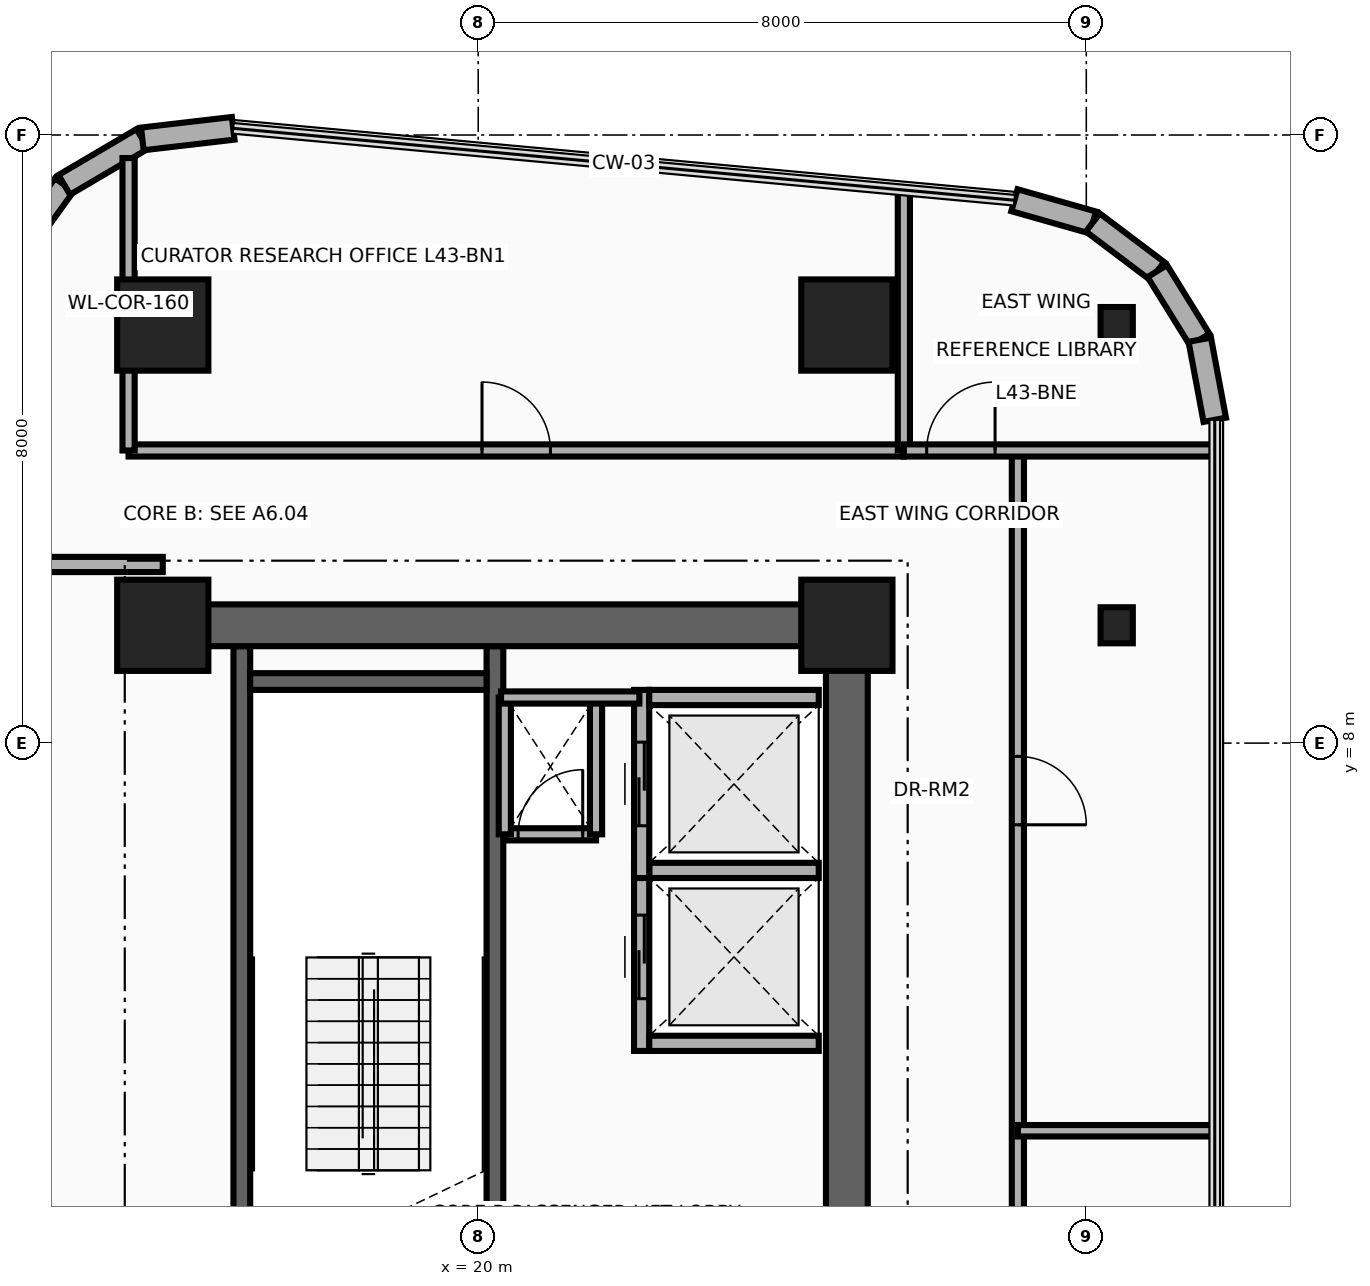
"""IFC4 building model, lengths in metres.
Left out: names, types, materials, properties, quantities, classifications, styles, units other than length and angle.
Written with IfcOpenShell. Run it as: python <this file> out.ifc"""

import sys

from ifc_helpers import new_model, si_unit, direction, frame, frame_2d, origin, origin_2d, place, context, subcontext, project, spatial, rectangle, i_section, extrude, source, transform, mapped, element, fill, save


model = new_model("IFC4")
c1 = context("Model", 3, precision=1e-05, world=origin(), true_north=direction((0.0, 1.0)))
c2 = subcontext(c1, "Body", "Model", "MODEL_VIEW")
j1 = project(units=[si_unit("LENGTHUNIT", "METRE"), si_unit("PLANEANGLEUNIT", "RADIAN")], contexts=[c1])
p1 = place(None, origin())
s1 = spatial("IfcSite", under=j1, at=p1, CompositionType="ELEMENT")
p2 = place(p1, origin())
s2 = spatial("IfcBuilding", under=s1, at=p2, CompositionType="ELEMENT")
p3 = place(p2, frame((0.0, 0.0, 168.6)))
s3 = spatial("IfcBuildingStorey", under=s2, at=p3, CompositionType="ELEMENT", Elevation=168.6)
for number, where, z_axis, x_axis in (
    (1, (16.89, 0.68, 0.0), (0.0, 0.0, 1.0), (0.0, 1.0, 0.0)),
    (2, (20.22, 0.68, 0.0), (0.0, 0.0, 1.0), (0.0, 1.0, 0.0)),
):
    element("IfcWall", number, at=place(p3, frame(where, z_axis=z_axis, x_axis=x_axis)), inside=s3, PredefinedType="SHEAR", context=c2, shape_type="SweptSolid", body=[
        extrude(rectangle(XDim=8.595, YDim=0.22, at=frame_2d((4.297, 0.0))), origin(), (0.0, 0.0, 1.0), 3.3),
    ])
p4 = place(p3, frame((17.0, 8.81, 0.0), z_axis=(0.0, 0.0, 1.0), x_axis=(1.0, 0.0, 0.0)))
e3 = element("IfcWall", 3, at=p4, inside=s3, PredefinedType="SHEAR", context=c2, shape_type="SweptSolid", body=[
    extrude(rectangle(XDim=3.11, YDim=0.22, at=frame_2d((1.555, 0.0))), origin(), (0.0, 0.0, 1.0), 3.3),
])
p5 = place(p3, frame((24.85, 0.95, 0.0), z_axis=(0.0, 0.0, 1.0), x_axis=(0.0, 1.0, 0.0)))
e4 = element("IfcWall", 4, at=p5, inside=s3, PredefinedType="SHEAR", context=c2, shape_type="SweptSolid", body=[
    extrude(rectangle(XDim=8.875, YDim=0.55, at=frame_2d((4.438, 0.0))), origin(), (0.0, 0.0, 1.0), 3.3),
])
p6 = place(p3, frame((15.85, 9.55, 0.0), z_axis=(0.0, 0.0, 1.0), x_axis=(1.0, 0.0, 0.0)))
e5 = element("IfcWall", 5, at=p6, inside=s3, PredefinedType="SHEAR", context=c2, shape_type="SweptSolid", body=[
    extrude(rectangle(XDim=9.0, YDim=0.55, at=frame_2d((4.5, 0.0))), origin(), (0.0, 0.0, 1.0), 3.3),
])
m1 = source(origin(), c2, "Body", "SweptSolid", [
    extrude(rectangle(XDim=1.2, YDim=1.2, at=origin_2d()), origin(), (0.0, 0.0, 1.0), 3.7),
])
for number, where, z_axis, x_axis in (
    (6, (15.85, 9.55, 0.0), (0.0, 0.0, 1.0), (1.0, 0.0, 0.0)),
    (7, (24.85, 9.55, 0.0), (0.0, 0.0, 1.0), (1.0, 0.0, 0.0)),
):
    element("IfcColumn", number, at=place(p3, frame(where, z_axis=z_axis, x_axis=x_axis)), inside=s3, PredefinedType="COLUMN", context=c2, shape_type="MappedRepresentation", body=[
        mapped(m1, transform((0.0, 0.0, 0.0), x_axis=(1.0, 0.0, 0.0), y_axis=(0.0, 1.0, 0.0), z_axis=(0.0, 0.0, 1.0), scale=1.0)),
    ])
m2 = source(origin(), c2, "Body", "SweptSolid", [
    extrude(i_section(OverallWidth=0.424, OverallDepth=0.474, WebThickness=0.048, FlangeThickness=0.077, at=origin_2d()), origin(), (0.0, 0.0, 1.0), 3.7),
])
p7 = place(p3, frame((28.4, 9.55, 0.0), z_axis=(0.0, 0.0, 1.0), x_axis=(1.0, 0.0, 0.0)))
e8 = element("IfcColumn", 8, at=p7, inside=s3, PredefinedType="COLUMN", context=c2, shape_type="MappedRepresentation", body=[
    mapped(m2, transform((0.0, 0.0, 0.0), x_axis=(1.0, 0.0, 0.0), y_axis=(0.0, 1.0, 0.0), z_axis=(0.0, 0.0, 1.0), scale=1.0)),
])
for number, where, z_axis, x_axis in (
    (9, (15.85, 13.5, 0.0), (0.0, 0.0, 1.0), (1.0, 0.0, 0.0)),
    (10, (24.85, 13.5, 0.0), (0.0, 0.0, 1.0), (1.0, 0.0, 0.0)),
):
    element("IfcColumn", number, at=place(p3, frame(where, z_axis=z_axis, x_axis=x_axis)), inside=s3, PredefinedType="COLUMN", context=c2, shape_type="MappedRepresentation", body=[
        mapped(m1, transform((0.0, 0.0, 0.0), x_axis=(1.0, 0.0, 0.0), y_axis=(0.0, 1.0, 0.0), z_axis=(0.0, 0.0, 1.0), scale=1.0)),
    ])
p8 = place(p3, frame((28.4, 13.5, 0.0), z_axis=(0.0, 0.0, 1.0), x_axis=(1.0, 0.0, 0.0)))
e11 = element("IfcColumn", 11, at=p8, inside=s3, PredefinedType="COLUMN", context=c2, shape_type="MappedRepresentation", body=[
    mapped(m2, transform((0.0, 0.0, 0.0), x_axis=(1.0, 0.0, 0.0), y_axis=(0.0, 1.0, 0.0), z_axis=(0.0, 0.0, 1.0), scale=1.0)),
])
for number, where, z_axis, x_axis in (
    (12, (13.858, 14.377, 0.0), (0.0, 0.0, 1.0), (0.584, 0.812, 0.0)),
    (13, (14.554, 15.344, 0.0), (0.0, 0.0, 1.0), (0.862, 0.507, 0.0)),
):
    element("IfcWall", number, at=place(p3, frame(where, z_axis=z_axis, x_axis=x_axis)), inside=s3, PredefinedType="SOLIDWALL", context=c2, shape_type="SweptSolid", body=[
        extrude(rectangle(XDim=1.192, YDim=0.3, at=frame_2d((0.596, 0.0))), origin(), (0.0, 0.0, 1.0), 3.3),
    ])
p9 = place(p3, frame((15.581, 15.949, 0.0), z_axis=(0.0, 0.0, 1.0), x_axis=(0.993288417722, 0.115663819837, 0.0)))
e14 = element("IfcWall", 14, at=p9, inside=s3, PredefinedType="SOLIDWALL", context=c2, shape_type="SweptSolid", body=[
    extrude(rectangle(XDim=1.203, YDim=0.3, at=frame_2d((0.602, 0.0))), origin(), (0.0, 0.0, 1.0), 3.3),
])
p10 = place(p3, frame((27.055, 15.142, 0.0), z_axis=(0.0, 0.0, 1.0), x_axis=(0.962012179147, -0.273006533206, 0.0)))
e15 = element("IfcWall", 15, at=p10, inside=s3, PredefinedType="SOLIDWALL", context=c2, shape_type="SweptSolid", body=[
    extrude(rectangle(XDim=1.072, YDim=0.3, at=frame_2d((0.536, 0.0))), origin(), (0.0, 0.0, 1.0), 3.3),
])
for number, where, z_axis, x_axis in (
    (16, (28.086, 14.849, 0.0), (0.0, 0.0, 1.0), (0.798, -0.602, 0.0)),
    (17, (28.934, 14.21, 0.0), (0.0, 0.0, 1.0), (0.527, -0.85, 0.0)),
):
    element("IfcWall", number, at=place(p3, frame(where, z_axis=z_axis, x_axis=x_axis)), inside=s3, PredefinedType="SOLIDWALL", context=c2, shape_type="SweptSolid", body=[
        extrude(rectangle(XDim=1.062, YDim=0.3, at=frame_2d((0.531, 0.0))), origin(), (0.0, 0.0, 1.0), 3.3),
    ])
p11 = place(p3, frame((29.493, 13.307, 0.0), z_axis=(0.0, 0.0, 1.0), x_axis=(0.183752343116, -0.98297257154, 0.0)))
e18 = element("IfcWall", 18, at=p11, inside=s3, PredefinedType="SOLIDWALL", context=c2, shape_type="SweptSolid", body=[
    extrude(rectangle(XDim=1.072, YDim=0.3, at=frame_2d((0.536, 0.0))), origin(), (0.0, 0.0, 1.0), 3.3),
])
p12 = place(p3, frame((22.15, 3.95, 0.0), z_axis=(0.0, 0.0, 1.0), x_axis=(0.0, 1.0, 0.0)))
e19 = element("IfcWall", 19, at=p12, inside=s3, PredefinedType="MOVABLE", context=c2, shape_type="SweptSolid", body=[
    extrude(rectangle(XDim=2.475, YDim=0.2, at=frame_2d((1.238, 0.0))), origin(), (0.0, 0.0, 1.0), 3.3),
])
p13 = place(p12, frame((0.688, 0.0, 0.0)))
e20 = element("IfcOpeningElement", 20, at=p13, cuts=e19, PredefinedType="OPENING", context=c2, shape_type="SweptSolid", body=[
    extrude(rectangle(XDim=1.1, YDim=2.1, at=frame_2d((0.55, 1.05))), frame((0.0, 0.115, 0.0), z_axis=(0.0, -1.0, 0.0), x_axis=(1.0, 0.0, 0.0)), (0.0, 0.0, 1.0), 0.23),
])
for number, where, z_axis, x_axis in (
    (21, (22.25, 4.05, 0.0), (0.0, 0.0, 1.0), (1.0, 0.0, 0.0)),
    (22, (22.25, 6.325, 0.0), (0.0, 0.0, 1.0), (1.0, 0.0, 0.0)),
):
    element("IfcWall", number, at=place(p3, frame(where, z_axis=z_axis, x_axis=x_axis)), inside=s3, PredefinedType="MOVABLE", context=c2, shape_type="SweptSolid", body=[
        extrude(rectangle(XDim=2.23, YDim=0.2, at=frame_2d((1.115, 0.0))), origin(), (0.0, 0.0, 1.0), 3.3),
    ])
p14 = place(p3, frame((22.15, 6.225, 0.0), z_axis=(0.0, 0.0, 1.0), x_axis=(0.0, 1.0, 0.0)))
e23 = element("IfcWall", 23, at=p14, inside=s3, PredefinedType="MOVABLE", context=c2, shape_type="SweptSolid", body=[
    extrude(rectangle(XDim=2.475, YDim=0.2, at=frame_2d((1.237, 0.0))), origin(), (0.0, 0.0, 1.0), 3.3),
])
p15 = place(p14, frame((0.688, 0.0, 0.0)))
e24 = element("IfcOpeningElement", 24, at=p15, cuts=e23, PredefinedType="OPENING", context=c2, shape_type="SweptSolid", body=[
    extrude(rectangle(XDim=1.1, YDim=2.1, at=frame_2d((0.55, 1.05))), frame((0.0, 0.115, 0.0), z_axis=(0.0, -1.0, 0.0), x_axis=(1.0, 0.0, 0.0)), (0.0, 0.0, 1.0), 0.23),
])
p16 = place(p3, frame((22.25, 8.6, 0.0), z_axis=(0.0, 0.0, 1.0), x_axis=(1.0, 0.0, 0.0)))
e25 = element("IfcWall", 25, at=p16, inside=s3, PredefinedType="MOVABLE", context=c2, shape_type="SweptSolid", body=[
    extrude(rectangle(XDim=2.23, YDim=0.2, at=frame_2d((1.115, 0.0))), origin(), (0.0, 0.0, 1.0), 3.3),
])
p17 = place(p3, frame((20.35, 6.8, 0.0), z_axis=(0.0, 0.0, 1.0), x_axis=(1.0, 0.0, 0.0)))
e26 = element("IfcWall", 26, at=p17, inside=s3, PredefinedType="PARTITIONING", context=c2, shape_type="SweptSolid", body=[
    extrude(rectangle(XDim=1.2, YDim=0.16, at=frame_2d((0.6, 0.0))), origin(), (0.0, 0.0, 1.0), 3.3),
])
p18 = place(p17, frame((0.175, 0.0, 0.0)))
e27 = element("IfcOpeningElement", 27, at=p18, cuts=e26, PredefinedType="OPENING", context=c2, shape_type="SweptSolid", body=[
    extrude(rectangle(XDim=0.85, YDim=2.05, at=frame_2d((0.425, 1.025))), frame((0.0, 0.095, 0.0), z_axis=(0.0, -1.0, 0.0), x_axis=(1.0, 0.0, 0.0)), (0.0, 0.0, 1.0), 0.19),
])
for number, where, z_axis, x_axis in (
    (28, (21.55, 6.8, 0.0), (0.0, 0.0, 1.0), (0.0, 1.0, 0.0)),
    (29, (20.35, 6.8, 0.0), (0.0, 0.0, 1.0), (0.0, 1.0, 0.0)),
):
    element("IfcWall", number, at=place(p3, frame(where, z_axis=z_axis, x_axis=x_axis)), inside=s3, PredefinedType="PARTITIONING", context=c2, shape_type="SweptSolid", body=[
        extrude(rectangle(XDim=1.8, YDim=0.16, at=frame_2d((0.9, 0.0))), origin(), (0.0, 0.0, 1.0), 3.3),
    ])
p19 = place(p3, frame((20.3, 8.6, 0.0), z_axis=(0.0, 0.0, 1.0), x_axis=(1.0, 0.0, 0.0)))
e30 = element("IfcWall", 30, at=p19, inside=s3, PredefinedType="PARTITIONING", context=c2, shape_type="SweptSolid", body=[
    extrude(rectangle(XDim=1.82, YDim=0.16, at=frame_2d((0.91, 0.0))), origin(), (0.0, 0.0, 1.0), 3.3),
])
p20 = place(p3, frame((15.4, 11.85, 0.0), z_axis=(0.0, 0.0, 1.0), x_axis=(1.0, 0.0, 0.0)))
e31 = element("IfcWall", 31, at=p20, inside=s3, PredefinedType="PARTITIONING", context=c2, shape_type="SweptSolid", body=[
    extrude(rectangle(XDim=10.2, YDim=0.16, at=frame_2d((5.1, 0.0))), origin(), (0.0, 0.0, 1.0), 2.674),
])
p21 = place(p20, frame((4.65, 0.0, 0.0)))
e32 = element("IfcOpeningElement", 32, at=p21, cuts=e31, PredefinedType="OPENING", context=c2, shape_type="SweptSolid", body=[
    extrude(rectangle(XDim=0.9, YDim=2.1, at=frame_2d((0.45, 1.05))), frame((0.0, 0.095, 0.0), z_axis=(0.0, -1.0, 0.0), x_axis=(1.0, 0.0, 0.0)), (0.0, 0.0, 1.0), 0.19),
])
p22 = place(p3, frame((15.4, 11.85, 0.0), z_axis=(0.0, 0.0, 1.0), x_axis=(0.0, 1.0, 0.0)))
e33 = element("IfcWall", 33, at=p22, inside=s3, PredefinedType="PARTITIONING", context=c2, shape_type="SweptSolid", body=[
    extrude(rectangle(XDim=3.847, YDim=0.16, at=frame_2d((1.923, 0.0))), origin(), (0.0, 0.0, 1.0), 1.785),
])
p23 = place(p3, frame((25.6, 11.85, 0.0), z_axis=(0.0, 0.0, 1.0), x_axis=(0.0, 1.0, 0.0)))
e34 = element("IfcWall", 34, at=p23, inside=s3, PredefinedType="PARTITIONING", context=c2, shape_type="SweptSolid", body=[
    extrude(rectangle(XDim=3.426, YDim=0.16, at=frame_2d((1.713, 0.0))), origin(), (0.0, 0.0, 1.0), 2.085),
])
p24 = place(p3, frame((27.1, -11.701, 0.0), z_axis=(0.0, 0.0, 1.0), x_axis=(0.0, 1.0, 0.0)))
e35 = element("IfcWall", 35, at=p24, inside=s3, PredefinedType="PARTITIONING", context=c2, shape_type="SweptSolid", body=[
    extrude(rectangle(XDim=23.551, YDim=0.16, at=frame_2d((11.775, 0.0))), origin(), (0.0, 0.0, 1.0), 2.085),
])
p25 = place(p24, frame((2.56, 0.0, 0.0)))
e36 = element("IfcOpeningElement", 36, at=p25, cuts=e35, PredefinedType="OPENING", context=c2, shape_type="SweptSolid", body=[
    extrude(rectangle(XDim=0.9, YDim=2.04, at=frame_2d((0.45, 1.02))), frame((0.0, 0.095, 0.0), z_axis=(0.0, -1.0, 0.0), x_axis=(1.0, 0.0, 0.0)), (0.0, 0.0, 1.0), 0.19),
])
p26 = place(p24, frame((9.676, 0.0, 0.0)))
e37 = element("IfcOpeningElement", 37, at=p26, cuts=e35, PredefinedType="OPENING", context=c2, shape_type="SweptSolid", body=[
    extrude(rectangle(XDim=0.9, YDim=2.04, at=frame_2d((0.45, 1.02))), frame((0.0, 0.095, 0.0), z_axis=(0.0, -1.0, 0.0), x_axis=(1.0, 0.0, 0.0)), (0.0, 0.0, 1.0), 0.19),
])
p27 = place(p24, frame((18.626, 0.0, 0.0)))
e38 = element("IfcOpeningElement", 38, at=p27, cuts=e35, PredefinedType="OPENING", context=c2, shape_type="SweptSolid", body=[
    extrude(rectangle(XDim=0.9, YDim=2.04, at=frame_2d((0.45, 1.02))), frame((0.0, 0.095, 0.0), z_axis=(0.0, -1.0, 0.0), x_axis=(1.0, 0.0, 0.0)), (0.0, 0.0, 1.0), 0.19),
])
p28 = place(p3, frame((25.6, 11.85, 0.0), z_axis=(0.0, 0.0, 1.0), x_axis=(1.0, 0.0, 0.0)))
e39 = element("IfcWall", 39, at=p28, inside=s3, PredefinedType="PARTITIONING", context=c2, shape_type="SweptSolid", body=[
    extrude(rectangle(XDim=4.09, YDim=0.16, at=frame_2d((2.045, 0.0))), origin(), (0.0, 0.0, 1.0), 2.746),
])
p29 = place(p28, frame((0.3, 0.0, 0.0)))
e40 = element("IfcOpeningElement", 40, at=p29, cuts=e39, PredefinedType="OPENING", context=c2, shape_type="SweptSolid", body=[
    extrude(rectangle(XDim=0.9, YDim=2.1, at=frame_2d((0.45, 1.05))), frame((0.0, 0.095, 0.0), z_axis=(0.0, -1.0, 0.0), x_axis=(1.0, 0.0, 0.0)), (0.0, 0.0, 1.0), 0.19),
])
p30 = place(p3, frame((27.1, 2.9, 0.0), z_axis=(0.0, 0.0, 1.0), x_axis=(1.0, 0.0, 0.0)))
e41 = element("IfcWall", 41, at=p30, inside=s3, PredefinedType="PARTITIONING", context=c2, shape_type="SweptSolid", body=[
    extrude(rectangle(XDim=2.59, YDim=0.15, at=frame_2d((1.295, 0.0))), origin(), (0.0, 0.0, 1.0), 2.746),
])
p31 = place(p3, frame((13.61, 10.35, 0.0), z_axis=(0.0, 0.0, 1.0), x_axis=(1.0, 0.0, 0.0)))
e42 = element("IfcWall", 42, at=p31, inside=s3, PredefinedType="PARTITIONING", context=c2, shape_type="SweptSolid", body=[
    extrude(rectangle(XDim=2.24, YDim=0.2, at=frame_2d((1.12, 0.0))), origin(), (0.0, 0.0, 1.0), 2.674),
])
p32 = place(p13, origin())
e43 = element("IfcDoor", 43, at=p32, inside=s3, OperationType="DOUBLE_DOOR_SLIDING", PredefinedType="DOOR", context=c2, shape_type="SweptSolid", body=[
    extrude(rectangle(XDim=1.1, YDim=2.1, at=frame_2d((0.55, 1.05))), frame((0.0, 0.025, 0.0), z_axis=(0.0, -1.0, 0.0), x_axis=(1.0, 0.0, 0.0)), (0.0, 0.0, 1.0), 0.05),
])
fill(e20, e43)
p33 = place(p15, origin())
e44 = element("IfcDoor", 44, at=p33, inside=s3, OperationType="DOUBLE_DOOR_SLIDING", PredefinedType="DOOR", context=c2, shape_type="SweptSolid", body=[
    extrude(rectangle(XDim=1.1, YDim=2.1, at=frame_2d((0.55, 1.05))), frame((0.0, 0.025, 0.0), z_axis=(0.0, -1.0, 0.0), x_axis=(1.0, 0.0, 0.0)), (0.0, 0.0, 1.0), 0.05),
])
fill(e24, e44)
p34 = place(p18, origin())
e45 = element("IfcDoor", 45, at=p34, inside=s3, OperationType="SINGLE_SWING_LEFT", PredefinedType="DOOR", context=c2, shape_type="SweptSolid", body=[
    extrude(rectangle(XDim=0.85, YDim=2.05, at=frame_2d((0.425, 1.025))), frame((0.0, 0.025, 0.0), z_axis=(0.0, -1.0, 0.0), x_axis=(1.0, 0.0, 0.0)), (0.0, 0.0, 1.0), 0.05),
])
fill(e27, e45)
p35 = place(p21, origin())
e46 = element("IfcDoor", 46, at=p35, inside=s3, OperationType="SINGLE_SWING_RIGHT", PredefinedType="DOOR", context=c2, shape_type="SweptSolid", body=[
    extrude(rectangle(XDim=0.9, YDim=2.1, at=frame_2d((0.45, 1.05))), frame((0.0, 0.025, 0.0), z_axis=(0.0, -1.0, 0.0), x_axis=(1.0, 0.0, 0.0)), (0.0, 0.0, 1.0), 0.05),
])
fill(e32, e46)
p36 = place(p29, origin())
e47 = element("IfcDoor", 47, at=p36, inside=s3, OperationType="SINGLE_SWING_RIGHT", PredefinedType="DOOR", context=c2, shape_type="SweptSolid", body=[
    extrude(rectangle(XDim=0.9, YDim=2.1, at=frame_2d((0.45, 1.05))), frame((0.0, 0.025, 0.0), z_axis=(0.0, -1.0, 0.0), x_axis=(1.0, 0.0, 0.0)), (0.0, 0.0, 1.0), 0.05),
])
fill(e40, e47)
p37 = place(p27, frame((0.9, 0.0, 0.0), z_axis=(0.0, 0.0, 1.0), x_axis=(-1.0, 0.0, 0.0)))
e48 = element("IfcDoor", 48, at=p37, inside=s3, OperationType="SINGLE_SWING_LEFT", PredefinedType="DOOR", context=c2, shape_type="SweptSolid", body=[
    extrude(rectangle(XDim=0.9, YDim=2.04, at=frame_2d((0.45, 1.02))), frame((0.0, 0.025, 0.0), z_axis=(0.0, -1.0, 0.0), x_axis=(1.0, 0.0, 0.0)), (0.0, 0.0, 1.0), 0.05),
])
fill(e38, e48)
save(model, sys.argv[1])
